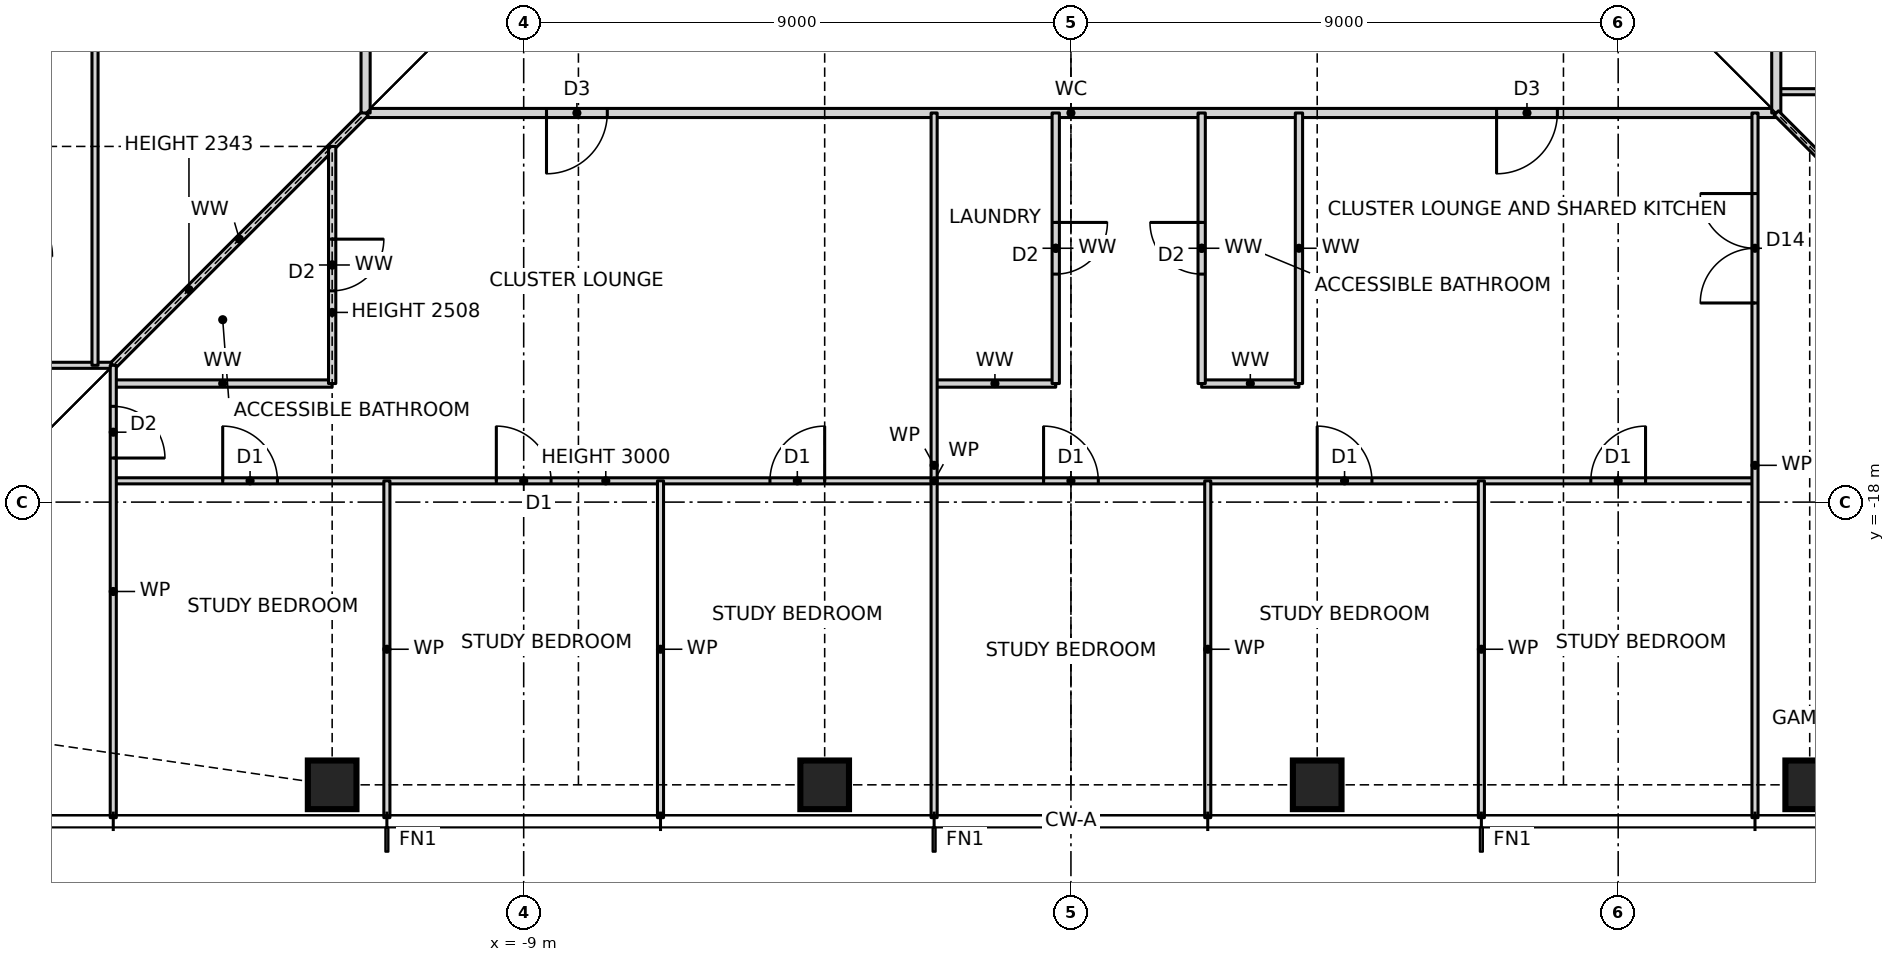
"""IFC4 building model, lengths in metres.
Left out: names, types, materials, properties, quantities, classifications, styles, units other than length and angle.
Written with IfcOpenShell. Run it as: python <this file> out.ifc"""

import sys

from ifc_helpers import new_model, si_unit, direction, frame, frame_2d, origin, origin_2d, place, context, subcontext, project, spatial, rectangle, hollow_rectangle, extrude, element, fill, save


model = new_model("IFC4")
c1 = context("Model", 3, precision=1e-05, world=origin(), true_north=direction((0.0, 1.0)))
c2 = subcontext(c1, "Body", "Model", "MODEL_VIEW")
j1 = project(units=[si_unit("LENGTHUNIT", "METRE"), si_unit("PLANEANGLEUNIT", "RADIAN")], contexts=[c1])
p1 = place(None, origin())
s1 = spatial("IfcSite", under=j1, at=p1, CompositionType="ELEMENT")
p2 = place(p1, origin())
s2 = spatial("IfcBuilding", under=s1, at=p2, CompositionType="ELEMENT")
p3 = place(p2, frame((0.0, 0.0, 36.0)))
s3 = spatial("IfcBuildingStorey", under=s2, at=p3, CompositionType="ELEMENT", Elevation=36.0)
for number, where, z_axis, x_axis in (
    (1, (-12.15, -22.65, 0.0), (0.0, 0.0, 1.0), (1.0, 0.0, 0.0)),
    (2, (-4.05, -22.65, 0.0), (0.0, 0.0, 1.0), (1.0, 0.0, 0.0)),
    (3, (4.05, -22.65, 0.0), (0.0, 0.0, 1.0), (1.0, 0.0, 0.0)),
    (4, (12.15, -22.65, 0.0), (0.0, 0.0, 1.0), (1.0, 0.0, 0.0)),
):
    element("IfcColumn", number, at=place(p3, frame(where, z_axis=z_axis, x_axis=x_axis)), inside=s3, PredefinedType="COLUMN", context=c2, shape_type="SweptSolid", body=[
        extrude(hollow_rectangle(XDim=0.8, YDim=0.8, WallThickness=0.09, at=origin_2d()), origin(), (0.0, 0.0, 1.0), 3.5),
    ])
p4 = place(p3, frame((-15.75, -17.65, 0.0), z_axis=(0.0, 0.0, 1.0), x_axis=(1.0, 0.0, 0.0)))
e5 = element("IfcWall", 5, at=p4, inside=s3, PredefinedType="PARTITIONING", context=c2, shape_type="SweptSolid", body=[
    extrude(rectangle(XDim=27.0, YDim=0.1, at=frame_2d((13.5, 0.0))), origin(), (0.0, 0.0, 1.0), 3.0),
])
p5 = place(p4, frame((1.8, 0.0, 0.0)))
e6 = element("IfcOpeningElement", 6, at=p5, cuts=e5, PredefinedType="OPENING", context=c2, shape_type="SweptSolid", body=[
    extrude(rectangle(XDim=0.9, YDim=2.1, at=frame_2d((0.45, 1.05))), frame((0.0, 0.06, 0.0), z_axis=(0.0, -1.0, 0.0), x_axis=(1.0, 0.0, 0.0)), (0.0, 0.0, 1.0), 0.12),
])
p6 = place(p4, frame((6.3, 0.0, 0.0)))
e7 = element("IfcOpeningElement", 7, at=p6, cuts=e5, PredefinedType="OPENING", context=c2, shape_type="SweptSolid", body=[
    extrude(rectangle(XDim=0.9, YDim=2.1, at=frame_2d((0.45, 1.05))), frame((0.0, 0.06, 0.0), z_axis=(0.0, -1.0, 0.0), x_axis=(1.0, 0.0, 0.0)), (0.0, 0.0, 1.0), 0.12),
])
p7 = place(p4, frame((10.8, 0.0, 0.0)))
e8 = element("IfcOpeningElement", 8, at=p7, cuts=e5, PredefinedType="OPENING", context=c2, shape_type="SweptSolid", body=[
    extrude(rectangle(XDim=0.9, YDim=2.1, at=frame_2d((0.45, 1.05))), frame((0.0, 0.06, 0.0), z_axis=(0.0, -1.0, 0.0), x_axis=(1.0, 0.0, 0.0)), (0.0, 0.0, 1.0), 0.12),
])
p8 = place(p4, frame((15.3, 0.0, 0.0)))
e9 = element("IfcOpeningElement", 9, at=p8, cuts=e5, PredefinedType="OPENING", context=c2, shape_type="SweptSolid", body=[
    extrude(rectangle(XDim=0.9, YDim=2.1, at=frame_2d((0.45, 1.05))), frame((0.0, 0.06, 0.0), z_axis=(0.0, -1.0, 0.0), x_axis=(1.0, 0.0, 0.0)), (0.0, 0.0, 1.0), 0.12),
])
p9 = place(p4, frame((19.8, 0.0, 0.0)))
e10 = element("IfcOpeningElement", 10, at=p9, cuts=e5, PredefinedType="OPENING", context=c2, shape_type="SweptSolid", body=[
    extrude(rectangle(XDim=0.9, YDim=2.1, at=frame_2d((0.45, 1.05))), frame((0.0, 0.06, 0.0), z_axis=(0.0, -1.0, 0.0), x_axis=(1.0, 0.0, 0.0)), (0.0, 0.0, 1.0), 0.12),
])
p10 = place(p4, frame((24.3, 0.0, 0.0)))
e11 = element("IfcOpeningElement", 11, at=p10, cuts=e5, PredefinedType="OPENING", context=c2, shape_type="SweptSolid", body=[
    extrude(rectangle(XDim=0.9, YDim=2.1, at=frame_2d((0.45, 1.05))), frame((0.0, 0.06, 0.0), z_axis=(0.0, -1.0, 0.0), x_axis=(1.0, 0.0, 0.0)), (0.0, 0.0, 1.0), 0.12),
])
p11 = place(p3, frame((-15.75, -16.05, 0.0), z_axis=(0.0, 0.0, 1.0), x_axis=(1.0, 0.0, 0.0)))
e12 = element("IfcWall", 12, at=p11, inside=s3, PredefinedType="PARTITIONING", context=c2, shape_type="SweptSolid", body=[
    extrude(rectangle(XDim=3.6, YDim=0.12, at=frame_2d((1.8, 0.0))), origin(), (0.0, 0.0, 1.0), 3.27),
])
p12 = place(p3, frame((-2.25, -16.05, 0.0), z_axis=(0.0, 0.0, 1.0), x_axis=(1.0, 0.0, 0.0)))
e13 = element("IfcWall", 13, at=p12, inside=s3, PredefinedType="PARTITIONING", context=c2, shape_type="SweptSolid", body=[
    extrude(rectangle(XDim=2.0, YDim=0.12, at=frame_2d((1.0, 0.0))), origin(), (0.0, 0.0, 1.0), 3.27),
])
p13 = place(p3, frame((2.15, -16.05, 0.0), z_axis=(0.0, 0.0, 1.0), x_axis=(1.0, 0.0, 0.0)))
e14 = element("IfcWall", 14, at=p13, inside=s3, PredefinedType="PARTITIONING", context=c2, shape_type="SweptSolid", body=[
    extrude(rectangle(XDim=1.6, YDim=0.12, at=frame_2d((0.8, 0.0))), origin(), (0.0, 0.0, 1.0), 3.27),
])
p14 = place(p3, frame((-23.19, -15.75, 0.0), z_axis=(0.0, 0.0, 1.0), x_axis=(1.0, 0.0, 0.0)))
e15 = element("IfcWall", 15, at=p14, inside=s3, PredefinedType="PARTITIONING", context=c2, shape_type="SweptSolid", body=[
    extrude(rectangle(XDim=7.44, YDim=0.1, at=frame_2d((3.72, 0.0))), origin(), (0.0, 0.0, 1.0), 3.27),
])
p15 = place(p3, frame((-11.6, -11.6, 0.0), z_axis=(0.0, 0.0, 1.0), x_axis=(1.0, 0.0, 0.0)))
e16 = element("IfcWall", 16, at=p15, inside=s3, PredefinedType="PARTITIONING", context=c2, shape_type="SweptSolid", body=[
    extrude(rectangle(XDim=23.2, YDim=0.15, at=frame_2d((11.6, 0.0))), origin(), (0.0, 0.0, 1.0), 3.27),
])
p16 = place(p15, frame((2.975, 0.0, 0.0)))
e17 = element("IfcOpeningElement", 17, at=p16, cuts=e16, PredefinedType="OPENING", context=c2, shape_type="SweptSolid", body=[
    extrude(rectangle(XDim=1.0, YDim=2.1, at=frame_2d((0.5, 1.05))), frame((0.0, 0.085, 0.0), z_axis=(0.0, -1.0, 0.0), x_axis=(1.0, 0.0, 0.0)), (0.0, 0.0, 1.0), 0.17),
])
p17 = place(p15, frame((18.6, 0.0, 0.0)))
e18 = element("IfcOpeningElement", 18, at=p17, cuts=e16, PredefinedType="OPENING", context=c2, shape_type="SweptSolid", body=[
    extrude(rectangle(XDim=1.0, YDim=2.1, at=frame_2d((0.5, 1.05))), frame((0.0, 0.085, 0.0), z_axis=(0.0, -1.0, 0.0), x_axis=(1.0, 0.0, 0.0)), (0.0, 0.0, 1.0), 0.17),
])
p18 = place(p3, frame((11.6, -11.25, 0.0), z_axis=(0.0, 0.0, 1.0), x_axis=(1.0, 0.0, 0.0)))
e19 = element("IfcWall", 19, at=p18, inside=s3, PredefinedType="PARTITIONING", context=c2, shape_type="SweptSolid", body=[
    extrude(rectangle(XDim=11.59, YDim=0.1, at=frame_2d((5.795, 0.0))), origin(), (0.0, 0.0, 1.0), 3.27),
])
p19 = place(p18, frame((1.325, 0.0, 0.0)))
e20 = element("IfcOpeningElement", 20, at=p19, cuts=e19, PredefinedType="OPENING", context=c2, shape_type="SweptSolid", body=[
    extrude(rectangle(XDim=1.8, YDim=2.1, at=frame_2d((0.9, 1.05))), frame((0.0, 0.06, 0.0), z_axis=(0.0, -1.0, 0.0), x_axis=(1.0, 0.0, 0.0)), (0.0, 0.0, 1.0), 0.12),
])
p20 = place(p3, frame((-15.75, -15.75, 0.0), z_axis=(0.0, 0.0, 1.0), x_axis=(0.707106781187, 0.707106781187, 0.0)))
e21 = element("IfcWall", 21, at=p20, inside=s3, PredefinedType="PARTITIONING", context=c2, shape_type="SweptSolid", body=[
    extrude(rectangle(XDim=5.869, YDim=0.12, at=frame_2d((2.935, 0.0))), origin(), (0.0, 0.0, 1.0), 2.343),
])
p21 = place(p3, frame((11.6, -11.6, 0.0), z_axis=(0.0, 0.0, 1.0), x_axis=(0.0, 1.0, 0.0)))
e22 = element("IfcWall", 22, at=p21, inside=s3, PredefinedType="PARTITIONING", context=c2, shape_type="SweptSolid", body=[
    extrude(rectangle(XDim=24.2, YDim=0.15, at=frame_2d((12.1, 0.0))), origin(), (0.0, 0.0, 1.0), 3.27),
])
p22 = place(p21, frame((3.6, 0.0, 0.0)))
e23 = element("IfcOpeningElement", 23, at=p22, cuts=e22, PredefinedType="OPENING", context=c2, shape_type="SweptSolid", body=[
    extrude(rectangle(XDim=1.0, YDim=2.1, at=frame_2d((0.5, 1.05))), frame((0.0, 0.085, 0.0), z_axis=(0.0, -1.0, 0.0), x_axis=(1.0, 0.0, 0.0)), (0.0, 0.0, 1.0), 0.17),
])
p23 = place(p21, frame((21.025, 0.0, 0.0)))
e24 = element("IfcOpeningElement", 24, at=p23, cuts=e22, PredefinedType="OPENING", context=c2, shape_type="SweptSolid", body=[
    extrude(rectangle(XDim=1.0, YDim=2.1, at=frame_2d((0.5, 1.05))), frame((0.0, 0.085, 0.0), z_axis=(0.0, -1.0, 0.0), x_axis=(1.0, 0.0, 0.0)), (0.0, 0.0, 1.0), 0.17),
])
p24 = place(p3, frame((11.25, -23.19, 0.0), z_axis=(0.0, 0.0, 1.0), x_axis=(0.0, 1.0, 0.0)))
e25 = element("IfcWall", 25, at=p24, inside=s3, PredefinedType="PARTITIONING", context=c2, shape_type="SweptSolid", body=[
    extrude(rectangle(XDim=11.59, YDim=0.1, at=frame_2d((5.795, 0.0))), origin(), (0.0, 0.0, 1.0), 3.27),
])
p25 = place(p24, frame((8.465, 0.0, 0.0)))
e26 = element("IfcOpeningElement", 26, at=p25, cuts=e25, PredefinedType="OPENING", context=c2, shape_type="SweptSolid", body=[
    extrude(rectangle(XDim=1.8, YDim=2.1, at=frame_2d((0.9, 1.05))), frame((0.0, 0.06, 0.0), z_axis=(0.0, -1.0, 0.0), x_axis=(1.0, 0.0, 0.0)), (0.0, 0.0, 1.0), 0.12),
])
p26 = place(p3, frame((6.75, -23.19, 0.0), z_axis=(0.0, 0.0, 1.0), x_axis=(0.0, 1.0, 0.0)))
e27 = element("IfcWall", 27, at=p26, inside=s3, PredefinedType="PARTITIONING", context=c2, shape_type="SweptSolid", body=[
    extrude(rectangle(XDim=5.54, YDim=0.1, at=frame_2d((2.77, 0.0))), origin(), (0.0, 0.0, 1.0), 3.27),
])
p27 = place(p3, frame((3.75, -16.05, 0.0), z_axis=(0.0, 0.0, 1.0), x_axis=(0.0, 1.0, 0.0)))
e28 = element("IfcWall", 28, at=p27, inside=s3, PredefinedType="PARTITIONING", context=c2, shape_type="SweptSolid", body=[
    extrude(rectangle(XDim=4.45, YDim=0.12, at=frame_2d((2.225, 0.0))), origin(), (0.0, 0.0, 1.0), 3.27),
])
p28 = place(p3, frame((2.25, -23.19, 0.0), z_axis=(0.0, 0.0, 1.0), x_axis=(0.0, 1.0, 0.0)))
e29 = element("IfcWall", 29, at=p28, inside=s3, PredefinedType="PARTITIONING", context=c2, shape_type="SweptSolid", body=[
    extrude(rectangle(XDim=5.54, YDim=0.1, at=frame_2d((2.77, 0.0))), origin(), (0.0, 0.0, 1.0), 3.27),
])
p29 = place(p3, frame((2.15, -16.05, 0.0), z_axis=(0.0, 0.0, 1.0), x_axis=(0.0, 1.0, 0.0)))
e30 = element("IfcWall", 30, at=p29, inside=s3, PredefinedType="PARTITIONING", context=c2, shape_type="SweptSolid", body=[
    extrude(rectangle(XDim=4.45, YDim=0.12, at=frame_2d((2.225, 0.0))), origin(), (0.0, 0.0, 1.0), 3.27),
])
p30 = place(p29, frame((1.8, 0.0, 0.0)))
e31 = element("IfcOpeningElement", 31, at=p30, cuts=e30, PredefinedType="OPENING", context=c2, shape_type="SweptSolid", body=[
    extrude(rectangle(XDim=0.85, YDim=2.1, at=frame_2d((0.425, 1.05))), frame((0.0, 0.07, 0.0), z_axis=(0.0, -1.0, 0.0), x_axis=(1.0, 0.0, 0.0)), (0.0, 0.0, 1.0), 0.14),
])
p31 = place(p3, frame((-0.25, -16.05, 0.0), z_axis=(0.0, 0.0, 1.0), x_axis=(0.0, 1.0, 0.0)))
e32 = element("IfcWall", 32, at=p31, inside=s3, PredefinedType="PARTITIONING", context=c2, shape_type="SweptSolid", body=[
    extrude(rectangle(XDim=4.45, YDim=0.12, at=frame_2d((2.225, 0.0))), origin(), (0.0, 0.0, 1.0), 3.27),
])
p32 = place(p31, frame((1.8, 0.0, 0.0)))
e33 = element("IfcOpeningElement", 33, at=p32, cuts=e32, PredefinedType="OPENING", context=c2, shape_type="SweptSolid", body=[
    extrude(rectangle(XDim=0.85, YDim=2.1, at=frame_2d((0.425, 1.05))), frame((0.0, 0.07, 0.0), z_axis=(0.0, -1.0, 0.0), x_axis=(1.0, 0.0, 0.0)), (0.0, 0.0, 1.0), 0.14),
])
p33 = place(p3, frame((-2.25, -23.19, 0.0), z_axis=(0.0, 0.0, 1.0), x_axis=(0.0, 1.0, 0.0)))
e34 = element("IfcWall", 34, at=p33, inside=s3, PredefinedType="PARTITIONING", context=c2, shape_type="SweptSolid", body=[
    extrude(rectangle(XDim=11.59, YDim=0.1, at=frame_2d((5.795, 0.0))), origin(), (0.0, 0.0, 1.0), 3.27),
])
for number, where, z_axis, x_axis in (
    (35, (-6.75, -23.19, 0.0), (0.0, 0.0, 1.0), (0.0, 1.0, 0.0)),
    (36, (-11.25, -23.19, 0.0), (0.0, 0.0, 1.0), (0.0, 1.0, 0.0)),
):
    element("IfcWall", number, at=place(p3, frame(where, z_axis=z_axis, x_axis=x_axis)), inside=s3, PredefinedType="PARTITIONING", context=c2, shape_type="SweptSolid", body=[
        extrude(rectangle(XDim=5.54, YDim=0.1, at=frame_2d((2.77, 0.0))), origin(), (0.0, 0.0, 1.0), 3.27),
    ])
p34 = place(p3, frame((-11.6, -11.6, 0.0), z_axis=(0.0, 0.0, 1.0), x_axis=(0.0, 1.0, 0.0)))
e37 = element("IfcWall", 37, at=p34, inside=s3, PredefinedType="PARTITIONING", context=c2, shape_type="SweptSolid", body=[
    extrude(rectangle(XDim=24.2, YDim=0.15, at=frame_2d((12.1, 0.0))), origin(), (0.0, 0.0, 1.0), 3.27),
])
p35 = place(p34, frame((12.14, 0.0, 0.0)))
e38 = element("IfcOpeningElement", 38, at=p35, cuts=e37, PredefinedType="OPENING", context=c2, shape_type="SweptSolid", body=[
    extrude(rectangle(XDim=1.0, YDim=2.1, at=frame_2d((0.5, 1.05))), frame((0.0, 0.085, 0.0), z_axis=(0.0, -1.0, 0.0), x_axis=(1.0, 0.0, 0.0)), (0.0, 0.0, 1.0), 0.17),
])
p36 = place(p3, frame((-12.15, -16.05, 0.0), z_axis=(0.0, 0.0, 1.0), x_axis=(0.0, 1.0, 0.0)))
e39 = element("IfcWall", 39, at=p36, inside=s3, PredefinedType="PARTITIONING", context=c2, shape_type="SweptSolid", body=[
    extrude(rectangle(XDim=3.9, YDim=0.12, at=frame_2d((1.95, 0.0))), origin(), (0.0, 0.0, 1.0), 2.508),
])
p37 = place(p36, frame((1.525, 0.0, 0.0)))
e40 = element("IfcOpeningElement", 40, at=p37, cuts=e39, PredefinedType="OPENING", context=c2, shape_type="SweptSolid", body=[
    extrude(rectangle(XDim=0.85, YDim=2.1, at=frame_2d((0.425, 1.05))), frame((0.0, 0.07, 0.0), z_axis=(0.0, -1.0, 0.0), x_axis=(1.0, 0.0, 0.0)), (0.0, 0.0, 1.0), 0.14),
])
p38 = place(p3, frame((-15.75, -23.19, 0.0), z_axis=(0.0, 0.0, 1.0), x_axis=(0.0, 1.0, 0.0)))
e41 = element("IfcWall", 41, at=p38, inside=s3, PredefinedType="PARTITIONING", context=c2, shape_type="SweptSolid", body=[
    extrude(rectangle(XDim=7.44, YDim=0.1, at=frame_2d((3.72, 0.0))), origin(), (0.0, 0.0, 1.0), 3.27),
])
p39 = place(p38, frame((5.915, 0.0, 0.0)))
e42 = element("IfcOpeningElement", 42, at=p39, cuts=e41, PredefinedType="OPENING", context=c2, shape_type="SweptSolid", body=[
    extrude(rectangle(XDim=0.85, YDim=2.1, at=frame_2d((0.425, 1.05))), frame((0.0, 0.06, 0.0), z_axis=(0.0, -1.0, 0.0), x_axis=(1.0, 0.0, 0.0)), (0.0, 0.0, 1.0), 0.12),
])
p40 = place(p3, frame((-16.05, -15.75, 0.0), z_axis=(0.0, 0.0, 1.0), x_axis=(0.0, 1.0, 0.0)))
e43 = element("IfcWall", 43, at=p40, inside=s3, PredefinedType="PARTITIONING", context=c2, shape_type="SweptSolid", body=[
    extrude(rectangle(XDim=14.08, YDim=0.1, at=frame_2d((7.04, 0.0))), origin(), (0.0, 0.0, 1.0), 3.27),
])
p41 = place(p40, frame((6.615, 0.0, 0.0)))
e44 = element("IfcOpeningElement", 44, at=p41, cuts=e43, PredefinedType="OPENING", context=c2, shape_type="SweptSolid", body=[
    extrude(rectangle(XDim=0.85, YDim=2.1, at=frame_2d((0.425, 1.05))), frame((0.0, 0.06, 0.0), z_axis=(0.0, -1.0, 0.0), x_axis=(1.0, 0.0, 0.0)), (0.0, 0.0, 1.0), 0.12),
])
p42 = place(p3, frame((15.75, -15.75, 0.0), z_axis=(0.0, 0.0, 1.0), x_axis=(-0.707106781187, 0.707106781187, 0.0)))
e45 = element("IfcWall", 45, at=p42, inside=s3, PredefinedType="PARTITIONING", context=c2, shape_type="SweptSolid", body=[
    extrude(rectangle(XDim=5.869, YDim=0.1, at=frame_2d((2.935, 0.0))), origin(), (0.0, 0.0, 1.0), 2.343),
])
p43 = place(p5, origin())
e46 = element("IfcDoor", 46, at=p43, inside=s3, OperationType="SINGLE_SWING_LEFT", PredefinedType="DOOR", context=c2, shape_type="SweptSolid", body=[
    extrude(rectangle(XDim=0.9, YDim=2.1, at=frame_2d((0.45, 1.05))), frame((0.0, 0.025, 0.0), z_axis=(0.0, -1.0, 0.0), x_axis=(1.0, 0.0, 0.0)), (0.0, 0.0, 1.0), 0.05),
])
fill(e6, e46)
p44 = place(p6, origin())
e47 = element("IfcDoor", 47, at=p44, inside=s3, OperationType="SINGLE_SWING_LEFT", PredefinedType="DOOR", context=c2, shape_type="SweptSolid", body=[
    extrude(rectangle(XDim=0.9, YDim=2.1, at=frame_2d((0.45, 1.05))), frame((0.0, 0.025, 0.0), z_axis=(0.0, -1.0, 0.0), x_axis=(1.0, 0.0, 0.0)), (0.0, 0.0, 1.0), 0.05),
])
fill(e7, e47)
p45 = place(p7, origin())
e48 = element("IfcDoor", 48, at=p45, inside=s3, OperationType="SINGLE_SWING_RIGHT", PredefinedType="DOOR", context=c2, shape_type="SweptSolid", body=[
    extrude(rectangle(XDim=0.9, YDim=2.1, at=frame_2d((0.45, 1.05))), frame((0.0, 0.025, 0.0), z_axis=(0.0, -1.0, 0.0), x_axis=(1.0, 0.0, 0.0)), (0.0, 0.0, 1.0), 0.05),
])
fill(e8, e48)
p46 = place(p16, frame((1.0, 0.0, 0.0), z_axis=(0.0, 0.0, 1.0), x_axis=(-1.0, 0.0, 0.0)))
e49 = element("IfcDoor", 49, at=p46, inside=s3, OperationType="SINGLE_SWING_RIGHT", PredefinedType="DOOR", context=c2, shape_type="SweptSolid", body=[
    extrude(rectangle(XDim=1.0, YDim=2.1, at=frame_2d((0.5, 1.05))), frame((0.0, 0.025, 0.0), z_axis=(0.0, -1.0, 0.0), x_axis=(1.0, 0.0, 0.0)), (0.0, 0.0, 1.0), 0.05),
])
fill(e17, e49)
p47 = place(p37, frame((0.85, 0.0, 0.0), z_axis=(0.0, 0.0, 1.0), x_axis=(-1.0, 0.0, 0.0)))
e50 = element("IfcDoor", 50, at=p47, inside=s3, OperationType="SINGLE_SWING_LEFT", PredefinedType="DOOR", context=c2, shape_type="SweptSolid", body=[
    extrude(rectangle(XDim=0.85, YDim=2.1, at=frame_2d((0.425, 1.05))), frame((0.0, 0.025, 0.0), z_axis=(0.0, -1.0, 0.0), x_axis=(1.0, 0.0, 0.0)), (0.0, 0.0, 1.0), 0.05),
])
fill(e40, e50)
p48 = place(p8, origin())
e51 = element("IfcDoor", 51, at=p48, inside=s3, OperationType="SINGLE_SWING_LEFT", PredefinedType="DOOR", context=c2, shape_type="SweptSolid", body=[
    extrude(rectangle(XDim=0.9, YDim=2.1, at=frame_2d((0.45, 1.05))), frame((0.0, 0.025, 0.0), z_axis=(0.0, -1.0, 0.0), x_axis=(1.0, 0.0, 0.0)), (0.0, 0.0, 1.0), 0.05),
])
fill(e9, e51)
p49 = place(p9, origin())
e52 = element("IfcDoor", 52, at=p49, inside=s3, OperationType="SINGLE_SWING_LEFT", PredefinedType="DOOR", context=c2, shape_type="SweptSolid", body=[
    extrude(rectangle(XDim=0.9, YDim=2.1, at=frame_2d((0.45, 1.05))), frame((0.0, 0.025, 0.0), z_axis=(0.0, -1.0, 0.0), x_axis=(1.0, 0.0, 0.0)), (0.0, 0.0, 1.0), 0.05),
])
fill(e10, e52)
p50 = place(p10, origin())
e53 = element("IfcDoor", 53, at=p50, inside=s3, OperationType="SINGLE_SWING_RIGHT", PredefinedType="DOOR", context=c2, shape_type="SweptSolid", body=[
    extrude(rectangle(XDim=0.9, YDim=2.1, at=frame_2d((0.45, 1.05))), frame((0.0, 0.025, 0.0), z_axis=(0.0, -1.0, 0.0), x_axis=(1.0, 0.0, 0.0)), (0.0, 0.0, 1.0), 0.05),
])
fill(e11, e53)
p51 = place(p17, frame((1.0, 0.0, 0.0), z_axis=(0.0, 0.0, 1.0), x_axis=(-1.0, 0.0, 0.0)))
e54 = element("IfcDoor", 54, at=p51, inside=s3, OperationType="SINGLE_SWING_RIGHT", PredefinedType="DOOR", context=c2, shape_type="SweptSolid", body=[
    extrude(rectangle(XDim=1.0, YDim=2.1, at=frame_2d((0.5, 1.05))), frame((0.0, 0.025, 0.0), z_axis=(0.0, -1.0, 0.0), x_axis=(1.0, 0.0, 0.0)), (0.0, 0.0, 1.0), 0.05),
])
fill(e18, e54)
p52 = place(p32, frame((0.85, 0.0, 0.0), z_axis=(0.0, 0.0, 1.0), x_axis=(-1.0, 0.0, 0.0)))
e55 = element("IfcDoor", 55, at=p52, inside=s3, OperationType="SINGLE_SWING_LEFT", PredefinedType="DOOR", context=c2, shape_type="SweptSolid", body=[
    extrude(rectangle(XDim=0.85, YDim=2.1, at=frame_2d((0.425, 1.05))), frame((0.0, 0.025, 0.0), z_axis=(0.0, -1.0, 0.0), x_axis=(1.0, 0.0, 0.0)), (0.0, 0.0, 1.0), 0.05),
])
fill(e33, e55)
p53 = place(p30, origin())
e56 = element("IfcDoor", 56, at=p53, inside=s3, OperationType="SINGLE_SWING_RIGHT", PredefinedType="DOOR", context=c2, shape_type="SweptSolid", body=[
    extrude(rectangle(XDim=0.85, YDim=2.1, at=frame_2d((0.425, 1.05))), frame((0.0, 0.025, 0.0), z_axis=(0.0, -1.0, 0.0), x_axis=(1.0, 0.0, 0.0)), (0.0, 0.0, 1.0), 0.05),
])
fill(e31, e56)
p54 = place(p25, origin())
e57 = element("IfcDoor", 57, at=p54, inside=s3, OperationType="DOUBLE_DOOR_SINGLE_SWING", PredefinedType="DOOR", context=c2, shape_type="SweptSolid", body=[
    extrude(rectangle(XDim=1.8, YDim=2.1, at=frame_2d((0.9, 1.05))), frame((0.0, 0.025, 0.0), z_axis=(0.0, -1.0, 0.0), x_axis=(1.0, 0.0, 0.0)), (0.0, 0.0, 1.0), 0.05),
])
fill(e26, e57)
p55 = place(p39, frame((0.85, 0.0, 0.0), z_axis=(0.0, 0.0, 1.0), x_axis=(-1.0, 0.0, 0.0)))
e58 = element("IfcDoor", 58, at=p55, inside=s3, OperationType="SINGLE_SWING_RIGHT", PredefinedType="DOOR", context=c2, shape_type="SweptSolid", body=[
    extrude(rectangle(XDim=0.85, YDim=2.1, at=frame_2d((0.425, 1.05))), frame((0.0, 0.025, 0.0), z_axis=(0.0, -1.0, 0.0), x_axis=(1.0, 0.0, 0.0)), (0.0, 0.0, 1.0), 0.05),
])
fill(e42, e58)
save(model, sys.argv[1])
